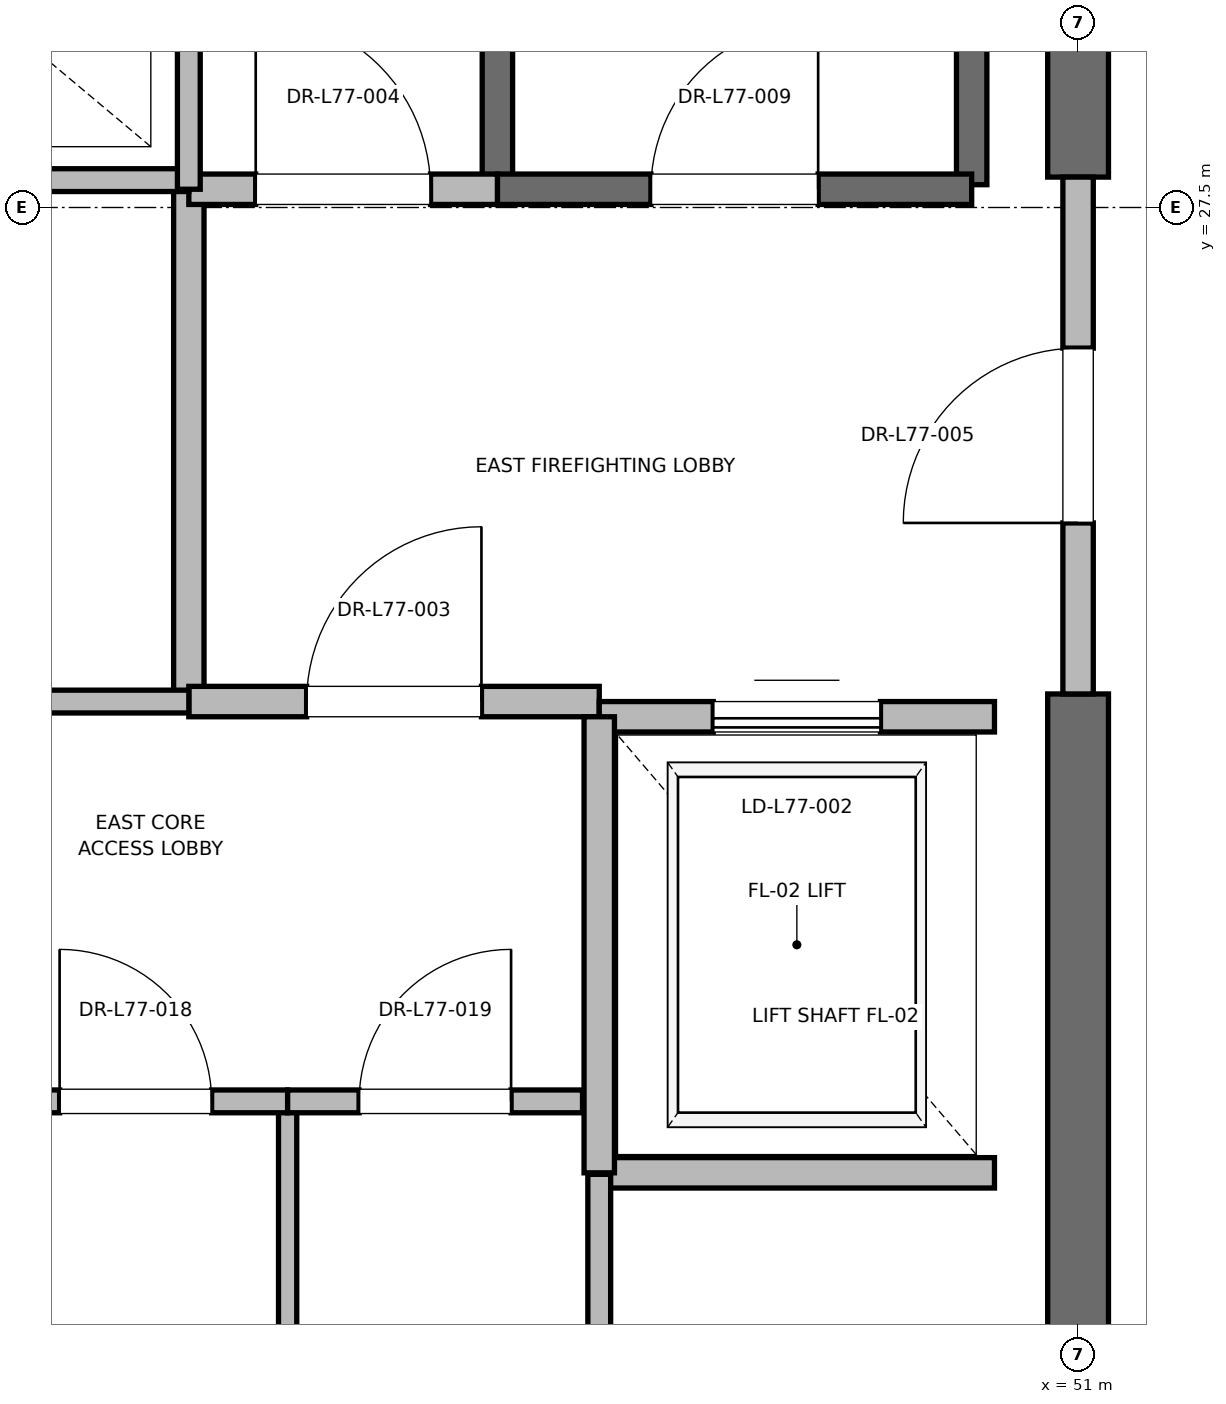
"""IFC4 building model, lengths in metres.
Left out: names, types, materials, properties, quantities, classifications, styles, units other than length and angle.
Written with IfcOpenShell. Run it as: python <this file> out.ifc"""

import sys

from ifc_helpers import new_model, si_unit, direction, frame, frame_2d, origin, place, context, subcontext, project, spatial, rectangle, extrude, element, fill, save


model = new_model("IFC4")
c1 = context("Model", 3, precision=1e-05, world=origin(), true_north=direction((0.0, 1.0)))
c2 = subcontext(c1, "Body", "Model", "MODEL_VIEW")
j1 = project(units=[si_unit("LENGTHUNIT", "METRE"), si_unit("PLANEANGLEUNIT", "RADIAN")], contexts=[c1])
p1 = place(None, origin())
s1 = spatial("IfcSite", under=j1, at=p1, CompositionType="ELEMENT")
p2 = place(p1, origin())
s2 = spatial("IfcBuilding", under=s1, at=p2, CompositionType="ELEMENT")
p3 = place(p2, frame((0.0, 0.0, 330.8)))
s3 = spatial("IfcBuildingStorey", under=s2, at=p3, CompositionType="ELEMENT", Elevation=330.8)
p4 = place(p3, frame((51.0, 18.5, 0.0), z_axis=(0.0, 0.0, 1.0), x_axis=(0.0, 1.0, 0.0)))
e1 = element("IfcWall", 1, at=p4, inside=s3, PredefinedType="SHEAR", context=c2, shape_type="SweptSolid", body=[
    extrude(rectangle(XDim=5.8, YDim=0.4, at=frame_2d((2.9, 0.0))), origin(), (0.0, 0.0, 1.0), 3.785),
])
p5 = place(p3, frame((51.0, 27.7, 0.0), z_axis=(0.0, 0.0, 1.0), x_axis=(0.0, 1.0, 0.0)))
e2 = element("IfcWall", 2, at=p5, inside=s3, PredefinedType="SHEAR", context=c2, shape_type="SweptSolid", body=[
    extrude(rectangle(XDim=8.8, YDim=0.4, at=frame_2d((4.4, 0.0))), origin(), (0.0, 0.0, 1.0), 3.785),
])
p6 = place(p3, frame((50.3, 27.65, 0.0), z_axis=(0.0, 0.0, 1.0), x_axis=(0.0, 1.0, 0.0)))
e3 = element("IfcWall", 3, at=p6, inside=s3, PredefinedType="SOLIDWALL", context=c2, shape_type="SweptSolid", body=[
    extrude(rectangle(XDim=8.15, YDim=0.2, at=frame_2d((4.075, 0.0))), origin(), (0.0, 0.0, 1.0), 3.785),
])
p7 = place(p3, frame((47.18, 27.62, 0.0), z_axis=(0.0, 0.0, 1.0), x_axis=(0.0, 1.0, 0.0)))
e4 = element("IfcWall", 4, at=p7, inside=s3, PredefinedType="SOLIDWALL", context=c2, shape_type="SweptSolid", body=[
    extrude(rectangle(XDim=8.18, YDim=0.2, at=frame_2d((4.09, 0.0))), origin(), (0.0, 0.0, 1.0), 3.785),
])
p8 = place(p3, frame((47.18, 27.62, 0.0), z_axis=(0.0, 0.0, 1.0), x_axis=(1.0, 0.0, 0.0)))
e5 = element("IfcWall", 5, at=p8, inside=s3, PredefinedType="SOLIDWALL", context=c2, shape_type="SweptSolid", body=[
    extrude(rectangle(XDim=3.12, YDim=0.2, at=frame_2d((1.56, 0.0))), origin(), (0.0, 0.0, 1.0), 3.785),
])
p9 = place(p8, frame((1.01, 0.0, 0.0)))
e6 = element("IfcOpeningElement", 6, at=p9, cuts=e5, PredefinedType="OPENING", context=c2, shape_type="SweptSolid", body=[
    extrude(rectangle(XDim=1.1, YDim=2.15, at=frame_2d((0.55, 1.075))), frame((0.0, 0.1, 0.0), z_axis=(0.0, -1.0, 0.0), x_axis=(1.0, 0.0, 0.0)), (0.0, 0.0, 1.0), 0.2),
])
p10 = place(p3, frame((45.15, 24.25, 0.0), z_axis=(0.0, 0.0, 1.0), x_axis=(0.0, 1.0, 0.0)))
e7 = element("IfcWall", 7, at=p10, inside=s3, PredefinedType="PARTITIONING", context=c2, shape_type="SweptSolid", body=[
    extrude(rectangle(XDim=3.37, YDim=0.2, at=frame_2d((1.685, 0.0))), origin(), (0.0, 0.0, 1.0), 3.785),
])
p11 = place(p3, frame((45.15, 24.25, 0.0), z_axis=(0.0, 0.0, 1.0), x_axis=(1.0, 0.0, 0.0)))
e8 = element("IfcWall", 8, at=p11, inside=s3, PredefinedType="PARTITIONING", context=c2, shape_type="SweptSolid", body=[
    extrude(rectangle(XDim=2.7, YDim=0.2, at=frame_2d((1.35, 0.0))), origin(), (0.0, 0.0, 1.0), 3.785),
])
p12 = place(p11, frame((0.775, 0.0, 0.0)))
e9 = element("IfcOpeningElement", 9, at=p12, cuts=e8, PredefinedType="OPENING", context=c2, shape_type="SweptSolid", body=[
    extrude(rectangle(XDim=1.15, YDim=2.2, at=frame_2d((0.575, 1.1))), frame((0.0, 0.1, 0.0), z_axis=(0.0, -1.0, 0.0), x_axis=(1.0, 0.0, 0.0)), (0.0, 0.0, 1.0), 0.2),
])
p13 = place(p3, frame((45.15, 27.62, 0.0), z_axis=(0.0, 0.0, 1.0), x_axis=(1.0, 0.0, 0.0)))
e10 = element("IfcWall", 10, at=p13, inside=s3, PredefinedType="PARTITIONING", context=c2, shape_type="SweptSolid", body=[
    extrude(rectangle(XDim=2.03, YDim=0.2, at=frame_2d((1.015, 0.0))), origin(), (0.0, 0.0, 1.0), 3.785),
])
p14 = place(p13, frame((0.44, 0.0, 0.0)))
e11 = element("IfcOpeningElement", 11, at=p14, cuts=e10, PredefinedType="OPENING", context=c2, shape_type="SweptSolid", body=[
    extrude(rectangle(XDim=1.15, YDim=2.2, at=frame_2d((0.575, 1.1))), frame((0.0, 0.1, 0.0), z_axis=(0.0, -1.0, 0.0), x_axis=(1.0, 0.0, 0.0)), (0.0, 0.0, 1.0), 0.2),
])
p15 = place(p3, frame((51.0, 24.3, 0.0), z_axis=(0.0, 0.0, 1.0), x_axis=(0.0, 1.0, 0.0)))
e12 = element("IfcWall", 12, at=p15, inside=s3, PredefinedType="PARTITIONING", context=c2, shape_type="SweptSolid", body=[
    extrude(rectangle(XDim=3.4, YDim=0.2, at=frame_2d((1.7, 0.0))), origin(), (0.0, 0.0, 1.0), 2.865),
])
p16 = place(p15, frame((1.125, 0.0, 0.0)))
e13 = element("IfcOpeningElement", 13, at=p16, cuts=e12, PredefinedType="OPENING", context=c2, shape_type="SweptSolid", body=[
    extrude(rectangle(XDim=1.15, YDim=2.2, at=frame_2d((0.575, 1.1))), frame((0.0, 0.1, 0.0), z_axis=(0.0, -1.0, 0.0), x_axis=(1.0, 0.0, 0.0)), (0.0, 0.0, 1.0), 0.2),
])
p17 = place(p3, frame((47.85, 21.15, 0.0), z_axis=(0.0, 0.0, 1.0), x_axis=(1.0, 0.0, 0.0)))
e14 = element("IfcWall", 14, at=p17, inside=s3, PredefinedType="SOLIDWALL", context=c2, shape_type="SweptSolid", body=[
    extrude(rectangle(XDim=2.6, YDim=0.2, at=frame_2d((1.3, 0.0))), origin(), (0.0, 0.0, 1.0), 3.785),
])
p18 = place(p3, frame((50.45, 24.15, 0.0), z_axis=(0.0, 0.0, 1.0), x_axis=(-1.0, 0.0, 0.0)))
e15 = element("IfcWall", 15, at=p18, inside=s3, PredefinedType="SOLIDWALL", context=c2, shape_type="SweptSolid", body=[
    extrude(rectangle(XDim=2.6, YDim=0.2, at=frame_2d((1.3, 0.0))), origin(), (0.0, 0.0, 1.0), 2.865),
])
p19 = place(p18, frame((0.75, 0.0, 0.0)))
e16 = element("IfcOpeningElement", 16, at=p19, cuts=e15, PredefinedType="OPENING", context=c2, shape_type="SweptSolid", body=[
    extrude(rectangle(XDim=1.1, YDim=2.2, at=frame_2d((0.55, 1.1))), frame((0.0, 0.1, 0.0), z_axis=(0.0, -1.0, 0.0), x_axis=(1.0, 0.0, 0.0)), (0.0, 0.0, 1.0), 0.2),
])
p20 = place(p3, frame((47.85, 24.15, 0.0), z_axis=(0.0, 0.0, 1.0), x_axis=(0.0, -1.0, 0.0)))
e17 = element("IfcWall", 17, at=p20, inside=s3, PredefinedType="SOLIDWALL", context=c2, shape_type="SweptSolid", body=[
    extrude(rectangle(XDim=3.0, YDim=0.2, at=frame_2d((1.5, 0.0))), origin(), (0.0, 0.0, 1.0), 3.785),
])
p21 = place(p3, frame((41.56, 27.68, 0.0), z_axis=(0.0, 0.0, 1.0), x_axis=(1.0, 0.0, 0.0)))
e18 = element("IfcWall", 18, at=p21, inside=s3, PredefinedType="PARTITIONING", context=c2, shape_type="SweptSolid", body=[
    extrude(rectangle(XDim=3.59, YDim=0.15, at=frame_2d((1.795, 0.0))), origin(), (0.0, 0.0, 1.0), 2.85),
])
p22 = place(p3, frame((47.85, 18.6, 0.0), z_axis=(0.0, 0.0, 1.0), x_axis=(0.0, 1.0, 0.0)))
e19 = element("IfcWall", 19, at=p22, inside=s3, PredefinedType="PARTITIONING", context=c2, shape_type="SweptSolid", body=[
    extrude(rectangle(XDim=2.54, YDim=0.15, at=frame_2d((1.27, 0.0))), origin(), (0.0, 0.0, 1.0), 2.85),
])
p23 = place(p3, frame((45.8, 18.6, 0.0), z_axis=(0.0, 0.0, 1.0), x_axis=(0.0, 1.0, 0.0)))
e20 = element("IfcWall", 20, at=p23, inside=s3, PredefinedType="PARTITIONING", context=c2, shape_type="SweptSolid", body=[
    extrude(rectangle(XDim=3.02, YDim=0.12, at=frame_2d((1.51, 0.0))), origin(), (0.0, 0.0, 1.0), 2.85),
])
p24 = place(p3, frame((43.8, 21.62, 0.0), z_axis=(0.0, 0.0, 1.0), x_axis=(1.0, 0.0, 0.0)))
e21 = element("IfcWall", 21, at=p24, inside=s3, PredefinedType="PARTITIONING", context=c2, shape_type="SweptSolid", body=[
    extrude(rectangle(XDim=2.0, YDim=0.15, at=frame_2d((1.0, 0.0))), origin(), (0.0, 0.0, 1.0), 2.85),
])
p25 = place(p24, frame((0.5, 0.0, 0.0)))
e22 = element("IfcOpeningElement", 22, at=p25, cuts=e21, PredefinedType="OPENING", context=c2, shape_type="SweptSolid", body=[
    extrude(rectangle(XDim=1.0, YDim=2.15, at=frame_2d((0.5, 1.075))), frame((0.0, 0.075, 0.0), z_axis=(0.0, -1.0, 0.0), x_axis=(1.0, 0.0, 0.0)), (0.0, 0.0, 1.0), 0.15),
])
p26 = place(p3, frame((45.8, 21.62, 0.0), z_axis=(0.0, 0.0, 1.0), x_axis=(1.0, 0.0, 0.0)))
e23 = element("IfcWall", 23, at=p26, inside=s3, PredefinedType="PARTITIONING", context=c2, shape_type="SweptSolid", body=[
    extrude(rectangle(XDim=1.94, YDim=0.15, at=frame_2d((0.97, 0.0))), origin(), (0.0, 0.0, 1.0), 2.85),
])
p27 = place(p26, frame((0.47, 0.0, 0.0)))
e24 = element("IfcOpeningElement", 24, at=p27, cuts=e23, PredefinedType="OPENING", context=c2, shape_type="SweptSolid", body=[
    extrude(rectangle(XDim=1.0, YDim=2.15, at=frame_2d((0.5, 1.075))), frame((0.0, 0.075, 0.0), z_axis=(0.0, -1.0, 0.0), x_axis=(1.0, 0.0, 0.0)), (0.0, 0.0, 1.0), 0.15),
])
p28 = place(p3, frame((41.76, 24.25, 0.0), z_axis=(0.0, 0.0, 1.0), x_axis=(1.0, 0.0, 0.0)))
e25 = element("IfcWall", 25, at=p28, inside=s3, PredefinedType="PARTITIONING", context=c2, shape_type="SweptSolid", body=[
    extrude(rectangle(XDim=3.39, YDim=0.15, at=frame_2d((1.695, 0.0))), origin(), (0.0, 0.0, 1.0), 2.85),
])
p29 = place(p28, frame((1.255, 0.0, 0.0)))
e26 = element("IfcOpeningElement", 26, at=p29, cuts=e25, PredefinedType="OPENING", context=c2, shape_type="SweptSolid", body=[
    extrude(rectangle(XDim=0.88, YDim=2.1, at=frame_2d((0.44, 1.05))), frame((0.0, 0.075, 0.0), z_axis=(0.0, -1.0, 0.0), x_axis=(1.0, 0.0, 0.0)), (0.0, 0.0, 1.0), 0.15),
])
p30 = place(p3, frame((45.15, 27.62, 0.0), z_axis=(0.0, 0.0, 1.0), x_axis=(0.0, 1.0, 0.0)))
e27 = element("IfcWall", 27, at=p30, inside=s3, PredefinedType="PARTITIONING", context=c2, shape_type="SweptSolid", body=[
    extrude(rectangle(XDim=3.1, YDim=0.15, at=frame_2d((1.55, 0.0))), origin(), (0.0, 0.0, 1.0), 2.85),
])
p31 = place(p9, origin())
e28 = element("IfcDoor", 28, at=p31, inside=s3, OperationType="SINGLE_SWING_RIGHT", PredefinedType="DOOR", context=c2, shape_type="SweptSolid", body=[
    extrude(rectangle(XDim=1.1, YDim=2.15, at=frame_2d((0.55, 1.075))), frame((0.0, 0.025, 0.0), z_axis=(0.0, -1.0, 0.0), x_axis=(1.0, 0.0, 0.0)), (0.0, 0.0, 1.0), 0.05),
])
fill(e6, e28)
p32 = place(p12, origin())
e29 = element("IfcDoor", 29, at=p32, inside=s3, OperationType="SINGLE_SWING_RIGHT", PredefinedType="DOOR", context=c2, shape_type="SweptSolid", body=[
    extrude(rectangle(XDim=1.15, YDim=2.2, at=frame_2d((0.575, 1.1))), frame((0.0, 0.025, 0.0), z_axis=(0.0, -1.0, 0.0), x_axis=(1.0, 0.0, 0.0)), (0.0, 0.0, 1.0), 0.05),
])
fill(e9, e29)
p33 = place(p14, origin())
e30 = element("IfcDoor", 30, at=p33, inside=s3, OperationType="SINGLE_SWING_LEFT", PredefinedType="DOOR", context=c2, shape_type="SweptSolid", body=[
    extrude(rectangle(XDim=1.15, YDim=2.2, at=frame_2d((0.575, 1.1))), frame((0.0, 0.025, 0.0), z_axis=(0.0, -1.0, 0.0), x_axis=(1.0, 0.0, 0.0)), (0.0, 0.0, 1.0), 0.05),
])
fill(e11, e30)
p34 = place(p16, origin())
e31 = element("IfcDoor", 31, at=p34, inside=s3, OperationType="SINGLE_SWING_LEFT", PredefinedType="DOOR", context=c2, shape_type="SweptSolid", body=[
    extrude(rectangle(XDim=1.15, YDim=2.2, at=frame_2d((0.575, 1.1))), frame((0.0, 0.025, 0.0), z_axis=(0.0, -1.0, 0.0), x_axis=(1.0, 0.0, 0.0)), (0.0, 0.0, 1.0), 0.05),
])
fill(e13, e31)
p35 = place(p19, origin())
e32 = element("IfcDoor", 32, at=p35, inside=s3, OperationType="SLIDING_TO_RIGHT", PredefinedType="DOOR", context=c2, shape_type="SweptSolid", body=[
    extrude(rectangle(XDim=1.1, YDim=2.2, at=frame_2d((0.55, 1.1))), frame((0.0, 0.025, 0.0), z_axis=(0.0, -1.0, 0.0), x_axis=(1.0, 0.0, 0.0)), (0.0, 0.0, 1.0), 0.05),
])
fill(e16, e32)
p36 = place(p25, origin())
e33 = element("IfcDoor", 33, at=p36, inside=s3, OperationType="SINGLE_SWING_LEFT", PredefinedType="DOOR", context=c2, shape_type="SweptSolid", body=[
    extrude(rectangle(XDim=1.0, YDim=2.15, at=frame_2d((0.5, 1.075))), frame((0.0, 0.025, 0.0), z_axis=(0.0, -1.0, 0.0), x_axis=(1.0, 0.0, 0.0)), (0.0, 0.0, 1.0), 0.05),
])
fill(e22, e33)
p37 = place(p27, origin())
e34 = element("IfcDoor", 34, at=p37, inside=s3, OperationType="SINGLE_SWING_RIGHT", PredefinedType="DOOR", context=c2, shape_type="SweptSolid", body=[
    extrude(rectangle(XDim=1.0, YDim=2.15, at=frame_2d((0.5, 1.075))), frame((0.0, 0.025, 0.0), z_axis=(0.0, -1.0, 0.0), x_axis=(1.0, 0.0, 0.0)), (0.0, 0.0, 1.0), 0.05),
])
fill(e24, e34)
save(model, sys.argv[1])
